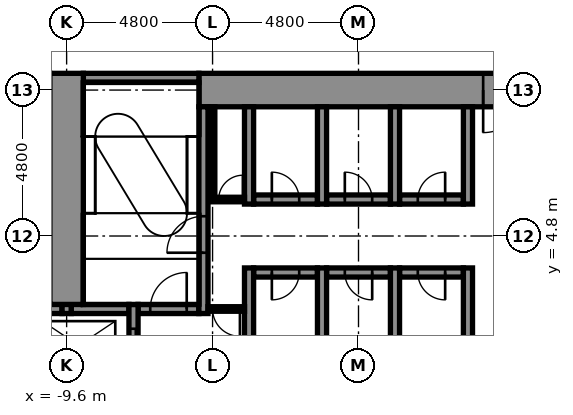
"""IFC4 building model, lengths in metres.
Left out: names, types, materials, properties, quantities, classifications, styles, units other than length and angle.
Written with IfcOpenShell. Run it as: python <this file> out.ifc"""

import sys

from ifc_helpers import new_model, si_unit, direction, frame, frame_2d, origin, place, context, subcontext, project, spatial, rectangle, extrude, element, fill, save


model = new_model("IFC4")
c1 = context("Model", 3, precision=1e-05, world=origin(), true_north=direction((0.0, 1.0)))
c2 = subcontext(c1, "Body", "Model", "MODEL_VIEW")
j1 = project(units=[si_unit("LENGTHUNIT", "METRE"), si_unit("PLANEANGLEUNIT", "RADIAN")], contexts=[c1])
p1 = place(None, origin())
s1 = spatial("IfcSite", under=j1, at=p1, CompositionType="ELEMENT")
p2 = place(p1, origin())
s2 = spatial("IfcBuilding", under=s1, at=p2, CompositionType="ELEMENT")
p3 = place(p2, origin())
s3 = spatial("IfcBuildingStorey", under=s2, at=p3, CompositionType="ELEMENT", Elevation=0.0)
p4 = place(p3, frame((-10.85, 2.4, -0.4), z_axis=(0.0, 0.0, 1.0), x_axis=(1.0, 0.0, 0.0)))
e1 = element("IfcWall", 1, at=p4, inside=s3, PredefinedType="STANDARD", context=c2, shape_type="SweptSolid", body=[
    extrude(rectangle(XDim=1.1, YDim=0.3, at=frame_2d((0.55, 0.0))), origin(), (0.0, 0.0, 1.0), 7.1),
])
p5 = place(p3, frame((-9.45, 2.4, -0.4), z_axis=(0.0, 0.0, 1.0), x_axis=(1.0, 0.0, 0.0)))
e2 = element("IfcWall", 2, at=p5, inside=s3, PredefinedType="STANDARD", context=c2, shape_type="SweptSolid", body=[
    extrude(rectangle(XDim=1.9, YDim=0.3, at=frame_2d((0.95, 0.0))), origin(), (0.0, 0.0, 1.0), 7.1),
])
p6 = place(p3, frame((-7.25, 2.4, -0.4), z_axis=(0.0, 0.0, 1.0), x_axis=(1.0, 0.0, 0.0)))
e3 = element("IfcWall", 3, at=p6, inside=s3, PredefinedType="STANDARD", context=c2, shape_type="SweptSolid", body=[
    extrude(rectangle(XDim=2.0, YDim=0.3, at=frame_2d((1.0, 0.0))), origin(), (0.0, 0.0, 1.0), 7.1),
])
p7 = place(p6, frame((0.4, 0.0, 0.4)))
e4 = element("IfcOpeningElement", 4, at=p7, cuts=e3, PredefinedType="OPENING", context=c2, shape_type="SweptSolid", body=[
    extrude(rectangle(XDim=1.2, YDim=2.1, at=frame_2d((0.6, 1.05))), frame((0.0, 0.16, 0.0), z_axis=(0.0, -1.0, 0.0), x_axis=(1.0, 0.0, 0.0)), (0.0, 0.0, 1.0), 0.32),
])
p8 = place(p3, frame((-3.45, 3.6, -0.4), z_axis=(0.0, 0.0, 1.0), x_axis=(1.0, 0.0, 0.0)))
e5 = element("IfcWall", 5, at=p8, inside=s3, PredefinedType="STANDARD", context=c2, shape_type="SweptSolid", body=[
    extrude(rectangle(XDim=2.1, YDim=0.3, at=frame_2d((1.05, 0.0))), origin(), (0.0, 0.0, 1.0), 7.1),
])
p9 = place(p8, frame((0.6, 0.0, 0.4)))
e6 = element("IfcOpeningElement", 6, at=p9, cuts=e5, PredefinedType="OPENING", context=c2, shape_type="SweptSolid", body=[
    extrude(rectangle(XDim=0.9, YDim=2.1, at=frame_2d((0.45, 1.05))), frame((0.0, 0.16, 0.0), z_axis=(0.0, -1.0, 0.0), x_axis=(1.0, 0.0, 0.0)), (0.0, 0.0, 1.0), 0.32),
])
p10 = place(p3, frame((-1.05, 3.6, -0.4), z_axis=(0.0, 0.0, 1.0), x_axis=(1.0, 0.0, 0.0)))
e7 = element("IfcWall", 7, at=p10, inside=s3, PredefinedType="STANDARD", context=c2, shape_type="SweptSolid", body=[
    extrude(rectangle(XDim=2.1, YDim=0.3, at=frame_2d((1.05, 0.0))), origin(), (0.0, 0.0, 1.0), 7.1),
])
p11 = place(p10, frame((0.6, 0.0, 0.4)))
e8 = element("IfcOpeningElement", 8, at=p11, cuts=e7, PredefinedType="OPENING", context=c2, shape_type="SweptSolid", body=[
    extrude(rectangle(XDim=0.9, YDim=2.1, at=frame_2d((0.45, 1.05))), frame((0.0, 0.16, 0.0), z_axis=(0.0, -1.0, 0.0), x_axis=(1.0, 0.0, 0.0)), (0.0, 0.0, 1.0), 0.32),
])
p12 = place(p3, frame((1.35, 3.6, -0.4), z_axis=(0.0, 0.0, 1.0), x_axis=(1.0, 0.0, 0.0)))
e9 = element("IfcWall", 9, at=p12, inside=s3, PredefinedType="STANDARD", context=c2, shape_type="SweptSolid", body=[
    extrude(rectangle(XDim=2.1, YDim=0.3, at=frame_2d((1.05, 0.0))), origin(), (0.0, 0.0, 1.0), 7.1),
])
p13 = place(p12, frame((0.6, 0.0, 0.4)))
e10 = element("IfcOpeningElement", 10, at=p13, cuts=e9, PredefinedType="OPENING", context=c2, shape_type="SweptSolid", body=[
    extrude(rectangle(XDim=0.9, YDim=2.1, at=frame_2d((0.45, 1.05))), frame((0.0, 0.16, 0.0), z_axis=(0.0, -1.0, 0.0), x_axis=(1.0, 0.0, 0.0)), (0.0, 0.0, 1.0), 0.32),
])
p14 = place(p3, frame((-3.45, 6.0, -0.4), z_axis=(0.0, 0.0, 1.0), x_axis=(1.0, 0.0, 0.0)))
e11 = element("IfcWall", 11, at=p14, inside=s3, PredefinedType="STANDARD", context=c2, shape_type="SweptSolid", body=[
    extrude(rectangle(XDim=2.1, YDim=0.3, at=frame_2d((1.05, 0.0))), origin(), (0.0, 0.0, 1.0), 7.1),
])
p15 = place(p14, frame((0.6, 0.0, 0.4)))
e12 = element("IfcOpeningElement", 12, at=p15, cuts=e11, PredefinedType="OPENING", context=c2, shape_type="SweptSolid", body=[
    extrude(rectangle(XDim=0.9, YDim=2.1, at=frame_2d((0.45, 1.05))), frame((0.0, 0.16, 0.0), z_axis=(0.0, -1.0, 0.0), x_axis=(1.0, 0.0, 0.0)), (0.0, 0.0, 1.0), 0.32),
])
p16 = place(p3, frame((-1.05, 6.0, -0.4), z_axis=(0.0, 0.0, 1.0), x_axis=(1.0, 0.0, 0.0)))
e13 = element("IfcWall", 13, at=p16, inside=s3, PredefinedType="STANDARD", context=c2, shape_type="SweptSolid", body=[
    extrude(rectangle(XDim=2.1, YDim=0.3, at=frame_2d((1.05, 0.0))), origin(), (0.0, 0.0, 1.0), 7.1),
])
p17 = place(p16, frame((0.6, 0.0, 0.4)))
e14 = element("IfcOpeningElement", 14, at=p17, cuts=e13, PredefinedType="OPENING", context=c2, shape_type="SweptSolid", body=[
    extrude(rectangle(XDim=0.9, YDim=2.1, at=frame_2d((0.45, 1.05))), frame((0.0, 0.16, 0.0), z_axis=(0.0, -1.0, 0.0), x_axis=(1.0, 0.0, 0.0)), (0.0, 0.0, 1.0), 0.32),
])
p18 = place(p3, frame((1.35, 6.0, -0.4), z_axis=(0.0, 0.0, 1.0), x_axis=(1.0, 0.0, 0.0)))
e15 = element("IfcWall", 15, at=p18, inside=s3, PredefinedType="STANDARD", context=c2, shape_type="SweptSolid", body=[
    extrude(rectangle(XDim=2.1, YDim=0.3, at=frame_2d((1.05, 0.0))), origin(), (0.0, 0.0, 1.0), 7.1),
])
p19 = place(p18, frame((0.6, 0.0, 0.4)))
e16 = element("IfcOpeningElement", 16, at=p19, cuts=e15, PredefinedType="OPENING", context=c2, shape_type="SweptSolid", body=[
    extrude(rectangle(XDim=0.9, YDim=2.1, at=frame_2d((0.45, 1.05))), frame((0.0, 0.16, 0.0), z_axis=(0.0, -1.0, 0.0), x_axis=(1.0, 0.0, 0.0)), (0.0, 0.0, 1.0), 0.32),
])
p20 = place(p3, frame((-5.25, 9.6, -0.4), z_axis=(0.0, 0.0, 1.0), x_axis=(1.0, 0.0, 0.0)))
e17 = element("IfcWall", 17, at=p20, inside=s3, PredefinedType="SHEAR", context=c2, shape_type="SweptSolid", body=[
    extrude(rectangle(XDim=14.3, YDim=1.1, at=frame_2d((7.15, 0.0))), origin(), (0.0, 0.0, 1.0), 7.1),
])
p21 = place(p20, frame((9.35, 0.0, 0.4)))
e18 = element("IfcOpeningElement", 18, at=p21, cuts=e17, PredefinedType="OPENING", context=c2, shape_type="SweptSolid", body=[
    extrude(rectangle(XDim=1.4, YDim=2.1, at=frame_2d((0.7, 1.05))), frame((0.0, 0.56, 0.0), z_axis=(0.0, -1.0, 0.0), x_axis=(1.0, 0.0, 0.0)), (0.0, 0.0, 1.0), 1.12),
])
p22 = place(p3, frame((-9.05, 10.0, -0.4), z_axis=(0.0, 0.0, 1.0), x_axis=(1.0, 0.0, 0.0)))
e19 = element("IfcWall", 19, at=p22, inside=s3, PredefinedType="STANDARD", context=c2, shape_type="SweptSolid", body=[
    extrude(rectangle(XDim=3.8, YDim=0.3, at=frame_2d((1.9, 0.0))), origin(), (0.0, 0.0, 1.0), 7.1),
])
p23 = place(p3, frame((-9.6, 2.25, -0.4), z_axis=(0.0, 0.0, 1.0), x_axis=(0.0, 1.0, 0.0)))
e20 = element("IfcWall", 20, at=p23, inside=s3, PredefinedType="STANDARD", context=c2, shape_type="SweptSolid", body=[
    extrude(rectangle(XDim=0.3, YDim=0.3, at=frame_2d((0.15, 0.0))), origin(), (0.0, 0.0, 1.0), 7.1),
])
p24 = place(p3, frame((-9.6, 2.55, -0.4), z_axis=(0.0, 0.0, 1.0), x_axis=(0.0, 1.0, 0.0)))
e21 = element("IfcWall", 21, at=p24, inside=s3, PredefinedType="SHEAR", context=c2, shape_type="SweptSolid", body=[
    extrude(rectangle(XDim=7.6, YDim=1.1, at=frame_2d((3.8, 0.0))), origin(), (0.0, 0.0, 1.0), 7.1),
])
p25 = place(p3, frame((-7.4, -2.55, -0.4), z_axis=(0.0, 0.0, 1.0), x_axis=(0.0, 1.0, 0.0)))
e22 = element("IfcWall", 22, at=p25, inside=s3, PredefinedType="STANDARD", context=c2, shape_type="SweptSolid", body=[
    extrude(rectangle(XDim=5.1, YDim=0.3, at=frame_2d((2.55, 0.0))), origin(), (0.0, 0.0, 1.0), 7.1),
])
p26 = place(p25, frame((0.8, 0.0, 0.4)))
e23 = element("IfcOpeningElement", 23, at=p26, cuts=e22, PredefinedType="OPENING", context=c2, shape_type="SweptSolid", body=[
    extrude(rectangle(XDim=1.1, YDim=2.1, at=frame_2d((0.55, 1.05))), frame((0.0, 0.16, 0.0), z_axis=(0.0, -1.0, 0.0), x_axis=(1.0, 0.0, 0.0)), (0.0, 0.0, 1.0), 0.32),
])
p27 = place(p25, frame((3.2, 0.0, 0.4)))
e24 = element("IfcOpeningElement", 24, at=p27, cuts=e22, PredefinedType="OPENING", context=c2, shape_type="SweptSolid", body=[
    extrude(rectangle(XDim=1.1, YDim=2.1, at=frame_2d((0.55, 1.05))), frame((0.0, 0.16, 0.0), z_axis=(0.0, -1.0, 0.0), x_axis=(1.0, 0.0, 0.0)), (0.0, 0.0, 1.0), 0.32),
])
p28 = place(p3, frame((-5.1, 2.25, -0.4), z_axis=(0.0, 0.0, 1.0), x_axis=(0.0, 1.0, 0.0)))
e25 = element("IfcWall", 25, at=p28, inside=s3, PredefinedType="STANDARD", context=c2, shape_type="SweptSolid", body=[
    extrude(rectangle(XDim=6.8, YDim=0.3, at=frame_2d((3.4, 0.0))), origin(), (0.0, 0.0, 1.0), 7.1),
])
p29 = place(p28, frame((2.0, 0.0, 0.4)))
e26 = element("IfcOpeningElement", 26, at=p29, cuts=e25, PredefinedType="OPENING", context=c2, shape_type="SweptSolid", body=[
    extrude(rectangle(XDim=1.2, YDim=2.1, at=frame_2d((0.6, 1.05))), frame((0.0, 0.16, 0.0), z_axis=(0.0, -1.0, 0.0), x_axis=(1.0, 0.0, 0.0)), (0.0, 0.0, 1.0), 0.32),
])
p30 = place(p3, frame((-3.6, -3.75, -0.4), z_axis=(0.0, 0.0, 1.0), x_axis=(0.0, 1.0, 0.0)))
e27 = element("IfcWall", 27, at=p30, inside=s3, PredefinedType="STANDARD", context=c2, shape_type="SweptSolid", body=[
    extrude(rectangle(XDim=7.5, YDim=0.3, at=frame_2d((3.75, 0.0))), origin(), (0.0, 0.0, 1.0), 7.1),
])
p31 = place(p3, frame((-3.6, 5.85, -0.4), z_axis=(0.0, 0.0, 1.0), x_axis=(0.0, 1.0, 0.0)))
e28 = element("IfcWall", 28, at=p31, inside=s3, PredefinedType="STANDARD", context=c2, shape_type="SweptSolid", body=[
    extrude(rectangle(XDim=3.2, YDim=0.3, at=frame_2d((1.6, 0.0))), origin(), (0.0, 0.0, 1.0), 7.1),
])
p32 = place(p3, frame((-1.2, -3.75, -0.4), z_axis=(0.0, 0.0, 1.0), x_axis=(0.0, 1.0, 0.0)))
e29 = element("IfcWall", 29, at=p32, inside=s3, PredefinedType="STANDARD", context=c2, shape_type="SweptSolid", body=[
    extrude(rectangle(XDim=7.5, YDim=0.3, at=frame_2d((3.75, 0.0))), origin(), (0.0, 0.0, 1.0), 7.1),
])
p33 = place(p3, frame((-1.2, 5.85, -0.4), z_axis=(0.0, 0.0, 1.0), x_axis=(0.0, 1.0, 0.0)))
e30 = element("IfcWall", 30, at=p33, inside=s3, PredefinedType="STANDARD", context=c2, shape_type="SweptSolid", body=[
    extrude(rectangle(XDim=3.2, YDim=0.3, at=frame_2d((1.6, 0.0))), origin(), (0.0, 0.0, 1.0), 7.1),
])
p34 = place(p3, frame((1.2, -3.75, -0.4), z_axis=(0.0, 0.0, 1.0), x_axis=(0.0, 1.0, 0.0)))
e31 = element("IfcWall", 31, at=p34, inside=s3, PredefinedType="STANDARD", context=c2, shape_type="SweptSolid", body=[
    extrude(rectangle(XDim=7.5, YDim=0.3, at=frame_2d((3.75, 0.0))), origin(), (0.0, 0.0, 1.0), 7.1),
])
p35 = place(p3, frame((1.2, 5.85, -0.4), z_axis=(0.0, 0.0, 1.0), x_axis=(0.0, 1.0, 0.0)))
e32 = element("IfcWall", 32, at=p35, inside=s3, PredefinedType="STANDARD", context=c2, shape_type="SweptSolid", body=[
    extrude(rectangle(XDim=3.2, YDim=0.3, at=frame_2d((1.6, 0.0))), origin(), (0.0, 0.0, 1.0), 7.1),
])
p36 = place(p3, frame((3.6, -3.75, -0.4), z_axis=(0.0, 0.0, 1.0), x_axis=(0.0, 1.0, 0.0)))
e33 = element("IfcWall", 33, at=p36, inside=s3, PredefinedType="STANDARD", context=c2, shape_type="SweptSolid", body=[
    extrude(rectangle(XDim=7.5, YDim=0.3, at=frame_2d((3.75, 0.0))), origin(), (0.0, 0.0, 1.0), 7.1),
])
p37 = place(p3, frame((3.6, 5.85, -0.4), z_axis=(0.0, 0.0, 1.0), x_axis=(0.0, 1.0, 0.0)))
e34 = element("IfcWall", 34, at=p37, inside=s3, PredefinedType="STANDARD", context=c2, shape_type="SweptSolid", body=[
    extrude(rectangle(XDim=3.2, YDim=0.3, at=frame_2d((1.6, 0.0))), origin(), (0.0, 0.0, 1.0), 7.1),
])
p38 = place(p3, frame((-4.8, 6.0, 0.0), z_axis=(0.0, 0.0, 1.0), x_axis=(0.0, 1.0, 0.0)))
e35 = element("IfcWall", 35, at=p38, inside=s3, PredefinedType="PARTITIONING", context=c2, shape_type="SweptSolid", body=[
    extrude(rectangle(XDim=3.05, YDim=0.15, at=frame_2d((1.525, 0.0))), origin(), (0.0, 0.0, 1.0), 6.7),
])
p39 = place(p3, frame((-4.8, 6.0, 0.0), z_axis=(0.0, 0.0, 1.0), x_axis=(1.0, 0.0, 0.0)))
e36 = element("IfcWall", 36, at=p39, inside=s3, PredefinedType="PARTITIONING", context=c2, shape_type="SweptSolid", body=[
    extrude(rectangle(XDim=1.05, YDim=0.15, at=frame_2d((0.525, 0.0))), origin(), (0.0, 0.0, 1.0), 6.7),
])
p40 = place(p39, frame((0.2, 0.0, 0.0)))
e37 = element("IfcOpeningElement", 37, at=p40, cuts=e36, PredefinedType="OPENING", context=c2, shape_type="SweptSolid", body=[
    extrude(rectangle(XDim=0.8, YDim=2.1, at=frame_2d((0.4, 1.05))), frame((0.0, 0.085, 0.0), z_axis=(0.0, -1.0, 0.0), x_axis=(1.0, 0.0, 0.0)), (0.0, 0.0, 1.0), 0.17),
])
p41 = place(p3, frame((-4.95, 2.4, 0.0), z_axis=(0.0, 0.0, 1.0), x_axis=(1.0, 0.0, 0.0)))
e38 = element("IfcWall", 38, at=p41, inside=s3, PredefinedType="PARTITIONING", context=c2, shape_type="SweptSolid", body=[
    extrude(rectangle(XDim=1.2, YDim=0.15, at=frame_2d((0.6, 0.0))), origin(), (0.0, 0.0, 1.0), 6.7),
])
p42 = place(p41, frame((0.15, 0.0, 0.0)))
e39 = element("IfcOpeningElement", 39, at=p42, cuts=e38, PredefinedType="OPENING", context=c2, shape_type="SweptSolid", body=[
    extrude(rectangle(XDim=0.9, YDim=2.1, at=frame_2d((0.45, 1.05))), frame((0.0, 0.085, 0.0), z_axis=(0.0, -1.0, 0.0), x_axis=(1.0, 0.0, 0.0)), (0.0, 0.0, 1.0), 0.17),
])
p43 = place(p40, origin())
e40 = element("IfcDoor", 40, at=p43, inside=s3, OperationType="SINGLE_SWING_RIGHT", PredefinedType="DOOR", context=c2, shape_type="SweptSolid", body=[
    extrude(rectangle(XDim=0.8, YDim=2.1, at=frame_2d((0.4, 1.05))), frame((0.0, 0.025, 0.0), z_axis=(0.0, -1.0, 0.0), x_axis=(1.0, 0.0, 0.0)), (0.0, 0.0, 1.0), 0.05),
])
fill(e37, e40)
p44 = place(p27, origin())
e41 = element("IfcDoor", 41, at=p44, inside=s3, OperationType="DOUBLE_DOOR_SLIDING", PredefinedType="DOOR", context=c2, shape_type="SweptSolid", body=[
    extrude(rectangle(XDim=1.1, YDim=2.1, at=frame_2d((0.55, 1.05))), frame((0.0, 0.025, 0.0), z_axis=(0.0, -1.0, 0.0), x_axis=(1.0, 0.0, 0.0)), (0.0, 0.0, 1.0), 0.05),
])
fill(e24, e41)
p45 = place(p29, origin())
e42 = element("IfcDoor", 42, at=p45, inside=s3, OperationType="SINGLE_SWING_LEFT", PredefinedType="DOOR", context=c2, shape_type="SweptSolid", body=[
    extrude(rectangle(XDim=1.2, YDim=2.1, at=frame_2d((0.6, 1.05))), frame((0.0, 0.025, 0.0), z_axis=(0.0, -1.0, 0.0), x_axis=(1.0, 0.0, 0.0)), (0.0, 0.0, 1.0), 0.05),
])
fill(e26, e42)
p46 = place(p15, origin())
e43 = element("IfcDoor", 43, at=p46, inside=s3, OperationType="SINGLE_SWING_LEFT", PredefinedType="DOOR", context=c2, shape_type="SweptSolid", body=[
    extrude(rectangle(XDim=0.9, YDim=2.1, at=frame_2d((0.45, 1.05))), frame((0.0, 0.025, 0.0), z_axis=(0.0, -1.0, 0.0), x_axis=(1.0, 0.0, 0.0)), (0.0, 0.0, 1.0), 0.05),
])
fill(e12, e43)
p47 = place(p17, origin())
e44 = element("IfcDoor", 44, at=p47, inside=s3, OperationType="SINGLE_SWING_LEFT", PredefinedType="DOOR", context=c2, shape_type="SweptSolid", body=[
    extrude(rectangle(XDim=0.9, YDim=2.1, at=frame_2d((0.45, 1.05))), frame((0.0, 0.025, 0.0), z_axis=(0.0, -1.0, 0.0), x_axis=(1.0, 0.0, 0.0)), (0.0, 0.0, 1.0), 0.05),
])
fill(e14, e44)
p48 = place(p19, origin())
e45 = element("IfcDoor", 45, at=p48, inside=s3, OperationType="SINGLE_SWING_RIGHT", PredefinedType="DOOR", context=c2, shape_type="SweptSolid", body=[
    extrude(rectangle(XDim=0.9, YDim=2.1, at=frame_2d((0.45, 1.05))), frame((0.0, 0.025, 0.0), z_axis=(0.0, -1.0, 0.0), x_axis=(1.0, 0.0, 0.0)), (0.0, 0.0, 1.0), 0.05),
])
fill(e16, e45)
p49 = place(p9, frame((0.9, 0.0, 0.0), z_axis=(0.0, 0.0, 1.0), x_axis=(-1.0, 0.0, 0.0)))
e46 = element("IfcDoor", 46, at=p49, inside=s3, OperationType="SINGLE_SWING_LEFT", PredefinedType="DOOR", context=c2, shape_type="SweptSolid", body=[
    extrude(rectangle(XDim=0.9, YDim=2.1, at=frame_2d((0.45, 1.05))), frame((0.0, 0.025, 0.0), z_axis=(0.0, -1.0, 0.0), x_axis=(1.0, 0.0, 0.0)), (0.0, 0.0, 1.0), 0.05),
])
fill(e6, e46)
p50 = place(p11, frame((0.9, 0.0, 0.0), z_axis=(0.0, 0.0, 1.0), x_axis=(-1.0, 0.0, 0.0)))
e47 = element("IfcDoor", 47, at=p50, inside=s3, OperationType="SINGLE_SWING_RIGHT", PredefinedType="DOOR", context=c2, shape_type="SweptSolid", body=[
    extrude(rectangle(XDim=0.9, YDim=2.1, at=frame_2d((0.45, 1.05))), frame((0.0, 0.025, 0.0), z_axis=(0.0, -1.0, 0.0), x_axis=(1.0, 0.0, 0.0)), (0.0, 0.0, 1.0), 0.05),
])
fill(e8, e47)
p51 = place(p13, frame((0.9, 0.0, 0.0), z_axis=(0.0, 0.0, 1.0), x_axis=(-1.0, 0.0, 0.0)))
e48 = element("IfcDoor", 48, at=p51, inside=s3, OperationType="SINGLE_SWING_RIGHT", PredefinedType="DOOR", context=c2, shape_type="SweptSolid", body=[
    extrude(rectangle(XDim=0.9, YDim=2.1, at=frame_2d((0.45, 1.05))), frame((0.0, 0.025, 0.0), z_axis=(0.0, -1.0, 0.0), x_axis=(1.0, 0.0, 0.0)), (0.0, 0.0, 1.0), 0.05),
])
fill(e10, e48)
p52 = place(p21, frame((1.4, 0.0, 0.0), z_axis=(0.0, 0.0, 1.0), x_axis=(-1.0, 0.0, 0.0)))
e49 = element("IfcDoor", 49, at=p52, inside=s3, OperationType="SINGLE_SWING_LEFT", PredefinedType="DOOR", context=c2, shape_type="SweptSolid", body=[
    extrude(rectangle(XDim=1.4, YDim=2.1, at=frame_2d((0.7, 1.05))), frame((0.0, 0.025, 0.0), z_axis=(0.0, -1.0, 0.0), x_axis=(1.0, 0.0, 0.0)), (0.0, 0.0, 1.0), 0.05),
])
fill(e18, e49)
p53 = place(p42, frame((0.9, 0.0, 0.0), z_axis=(0.0, 0.0, 1.0), x_axis=(-1.0, 0.0, 0.0)))
e50 = element("IfcDoor", 50, at=p53, inside=s3, OperationType="SINGLE_SWING_RIGHT", PredefinedType="DOOR", context=c2, shape_type="SweptSolid", body=[
    extrude(rectangle(XDim=0.9, YDim=2.1, at=frame_2d((0.45, 1.05))), frame((0.0, 0.025, 0.0), z_axis=(0.0, -1.0, 0.0), x_axis=(1.0, 0.0, 0.0)), (0.0, 0.0, 1.0), 0.05),
])
fill(e39, e50)
p54 = place(p7, origin())
e51 = element("IfcDoor", 51, at=p54, inside=s3, OperationType="SINGLE_SWING_RIGHT", PredefinedType="DOOR", context=c2, shape_type="SweptSolid", body=[
    extrude(rectangle(XDim=1.2, YDim=2.1, at=frame_2d((0.6, 1.05))), frame((0.0, 0.025, 0.0), z_axis=(0.0, -1.0, 0.0), x_axis=(1.0, 0.0, 0.0)), (0.0, 0.0, 1.0), 0.05),
])
fill(e4, e51)
save(model, sys.argv[1])
